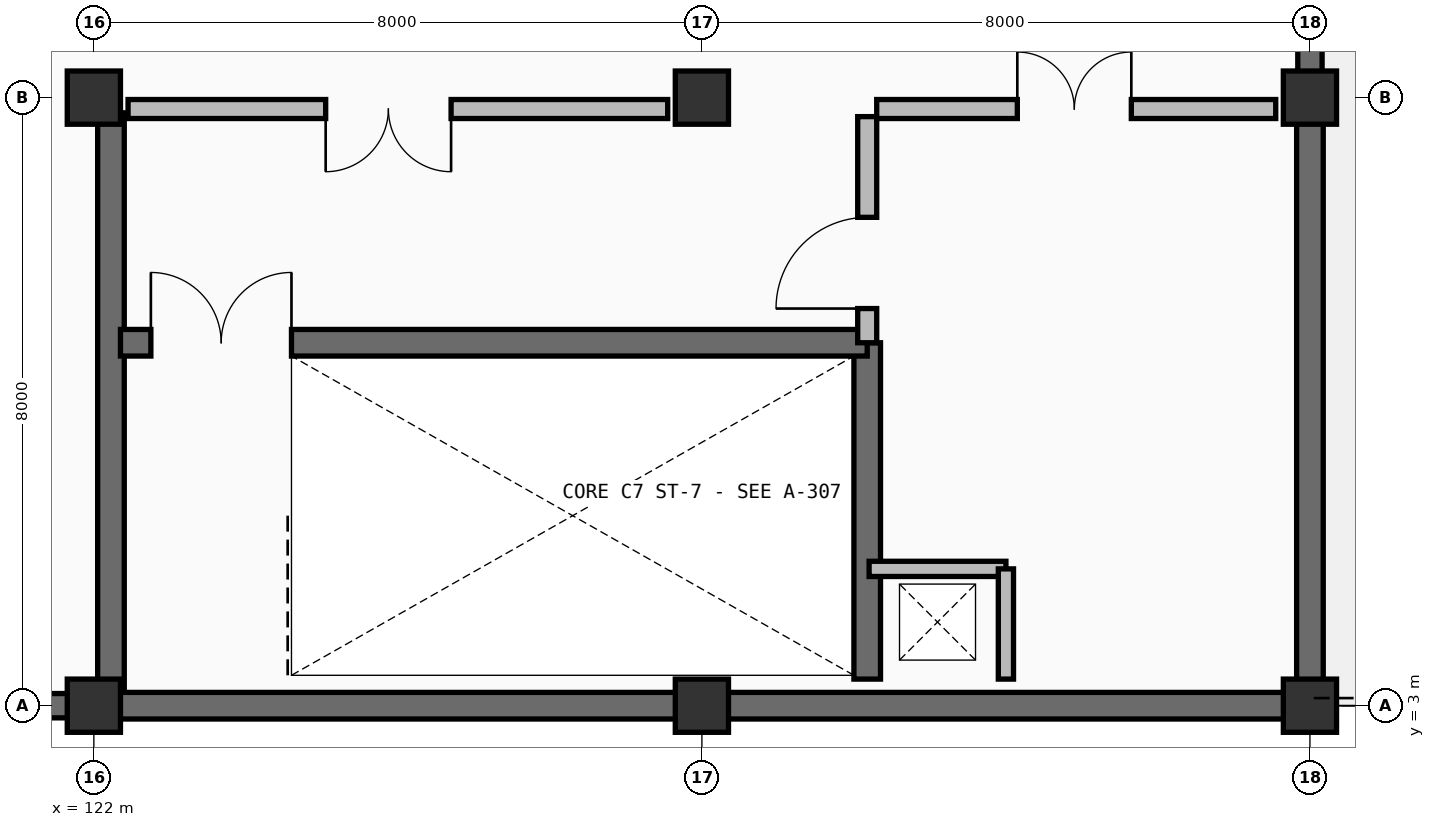
"""IFC4 building model, lengths in metres.
Left out: names, types, materials, properties, quantities, classifications, styles, units other than length and angle.
Written with IfcOpenShell. Run it as: python <this file> out.ifc"""

import sys

from ifc_helpers import new_model, si_unit, direction, frame, frame_2d, origin, origin_2d, place, context, subcontext, project, spatial, rectangle, extrude, element, fill, save


model = new_model("IFC4")
c1 = context("Model", 3, precision=1e-05, world=origin(), true_north=direction((0.0, 1.0)))
c2 = subcontext(c1, "Body", "Model", "MODEL_VIEW")
j1 = project(units=[si_unit("LENGTHUNIT", "METRE"), si_unit("PLANEANGLEUNIT", "RADIAN")], contexts=[c1])
p1 = place(None, origin())
s1 = spatial("IfcSite", under=j1, at=p1, CompositionType="ELEMENT")
p2 = place(p1, origin())
s2 = spatial("IfcBuilding", under=s1, at=p2, CompositionType="ELEMENT")
p3 = place(p2, frame((0.0, 0.0, 9.9)))
s3 = spatial("IfcBuildingStorey", under=s2, at=p3, CompositionType="ELEMENT", Elevation=9.9)
for number, where, z_axis, x_axis in (
    (1, (122.0, 3.0, 0.0), (0.0, 0.0, 1.0), (1.0, 0.0, 0.0)),
    (2, (122.0, 11.0, 0.0), (0.0, 0.0, 1.0), (1.0, 0.0, 0.0)),
    (3, (130.0, 3.0, 0.0), (0.0, 0.0, 1.0), (1.0, 0.0, 0.0)),
    (4, (130.0, 11.0, 0.0), (0.0, 0.0, 1.0), (1.0, 0.0, 0.0)),
    (5, (138.0, 3.0, 0.0), (0.0, 0.0, 1.0), (1.0, 0.0, 0.0)),
    (6, (138.0, 11.0, 0.0), (0.0, 0.0, 1.0), (1.0, 0.0, 0.0)),
):
    element("IfcColumn", number, at=place(p3, frame(where, z_axis=z_axis, x_axis=x_axis)), inside=s3, PredefinedType="COLUMN", context=c2, shape_type="SweptSolid", body=[
        extrude(rectangle(XDim=0.7, YDim=0.7, at=origin_2d()), origin(), (0.0, 0.0, 1.0), 4.5),
    ])
p4 = place(p3, frame((138.0, 19.0, 0.0), z_axis=(0.0, 0.0, 1.0), x_axis=(0.0, -1.0, 0.0)))
e7 = element("IfcWall", 7, at=p4, inside=s3, PredefinedType="SOLIDWALL", context=c2, shape_type="SweptSolid", body=[
    extrude(rectangle(XDim=8.0, YDim=0.32, at=frame_2d((4.0, 0.0))), origin(), (0.0, 0.0, 1.0), 4.5),
])
p5 = place(p4, frame((5.45, 0.0, 0.0)))
e8 = element("IfcOpeningElement", 8, at=p5, cuts=e7, PredefinedType="OPENING", context=c2, shape_type="SweptSolid", body=[
    extrude(rectangle(XDim=1.5, YDim=2.25, at=frame_2d((0.75, 1.125))), frame((0.0, 0.17, 0.0), z_axis=(0.0, -1.0, 0.0), x_axis=(1.0, 0.0, 0.0)), (0.0, 0.0, 1.0), 0.34),
])
for number, where, z_axis, x_axis in (
    (9, (138.0, 11.0, 0.0), (0.0, 0.0, 1.0), (0.0, -1.0, 0.0)),
    (10, (138.0, 3.0, 0.0), (0.0, 0.0, 1.0), (-1.0, 0.0, 0.0)),
    (11, (130.0, 3.0, 0.0), (0.0, 0.0, 1.0), (-1.0, 0.0, 0.0)),
):
    element("IfcWall", number, at=place(p3, frame(where, z_axis=z_axis, x_axis=x_axis)), inside=s3, PredefinedType="SHEAR", context=c2, shape_type="SweptSolid", body=[
        extrude(rectangle(XDim=8.0, YDim=0.35, at=frame_2d((4.0, 0.0))), origin(), (0.0, 0.0, 1.0), 4.5),
    ])
p6 = place(p3, frame((122.0, 3.0, 0.0), z_axis=(0.0, 0.0, 1.0), x_axis=(-1.0, 0.0, 0.0)))
e12 = element("IfcWall", 12, at=p6, inside=s3, PredefinedType="SOLIDWALL", context=c2, shape_type="SweptSolid", body=[
    extrude(rectangle(XDim=8.0, YDim=0.32, at=frame_2d((4.0, 0.0))), origin(), (0.0, 0.0, 1.0), 4.5),
])
p7 = place(p6, frame((1.85, 0.0, 1.0)))
e13 = element("IfcOpeningElement", 13, at=p7, cuts=e12, PredefinedType="OPENING", context=c2, shape_type="SweptSolid", body=[
    extrude(rectangle(XDim=1.1, YDim=1.45, at=frame_2d((0.55, 0.725))), frame((0.0, 0.17, 0.0), z_axis=(0.0, -1.0, 0.0), x_axis=(1.0, 0.0, 0.0)), (0.0, 0.0, 1.0), 0.34),
])
p8 = place(p6, frame((5.05, 0.0, 1.0)))
e14 = element("IfcOpeningElement", 14, at=p8, cuts=e12, PredefinedType="OPENING", context=c2, shape_type="SweptSolid", body=[
    extrude(rectangle(XDim=1.1, YDim=1.45, at=frame_2d((0.55, 0.725))), frame((0.0, 0.17, 0.0), z_axis=(0.0, -1.0, 0.0), x_axis=(1.0, 0.0, 0.0)), (0.0, 0.0, 1.0), 0.34),
])
p9 = place(p3, frame((122.225, 3.2, 0.0), z_axis=(0.0, 0.0, 1.0), x_axis=(0.0, 1.0, 0.0)))
e15 = element("IfcWall", 15, at=p9, inside=s3, PredefinedType="SHEAR", context=c2, shape_type="SweptSolid", body=[
    extrude(rectangle(XDim=7.6, YDim=0.35, at=frame_2d((3.8, 0.0))), origin(), (0.0, 0.0, 1.0), 4.2),
])
p10 = place(p3, frame((132.175, 3.35, 0.0), z_axis=(0.0, 0.0, 1.0), x_axis=(0.0, 1.0, 0.0)))
e16 = element("IfcWall", 16, at=p10, inside=s3, PredefinedType="SHEAR", context=c2, shape_type="SweptSolid", body=[
    extrude(rectangle(XDim=4.425, YDim=0.35, at=frame_2d((2.212, 0.0))), origin(), (0.0, 0.0, 1.0), 4.2),
])
p11 = place(p3, frame((132.2, 4.8, 0.0), z_axis=(0.0, 0.0, 1.0), x_axis=(1.0, 0.0, 0.0)))
e17 = element("IfcWall", 17, at=p11, inside=s3, PredefinedType="PARTITIONING", context=c2, shape_type="SweptSolid", body=[
    extrude(rectangle(XDim=1.8, YDim=0.2, at=frame_2d((0.9, 0.0))), origin(), (0.0, 0.0, 1.0), 4.2),
])
p12 = place(p3, frame((134.0, 3.35, 0.0), z_axis=(0.0, 0.0, 1.0), x_axis=(0.0, 1.0, 0.0)))
e18 = element("IfcWall", 18, at=p12, inside=s3, PredefinedType="PARTITIONING", context=c2, shape_type="SweptSolid", body=[
    extrude(rectangle(XDim=1.45, YDim=0.2, at=frame_2d((0.725, 0.0))), origin(), (0.0, 0.0, 1.0), 4.2),
])
p13 = place(p3, frame((122.35, 7.775, 0.0), z_axis=(0.0, 0.0, 1.0), x_axis=(1.0, 0.0, 0.0)))
e19 = element("IfcWall", 19, at=p13, inside=s3, PredefinedType="SHEAR", context=c2, shape_type="SweptSolid", body=[
    extrude(rectangle(XDim=9.825, YDim=0.35, at=frame_2d((4.913, 0.0))), origin(), (0.0, 0.0, 1.0), 4.2),
])
p14 = place(p13, frame((0.4, 0.0, 0.0)))
e20 = element("IfcOpeningElement", 20, at=p14, cuts=e19, PredefinedType="OPENING", context=c2, shape_type="SweptSolid", body=[
    extrude(rectangle(XDim=1.85, YDim=2.25, at=frame_2d((0.925, 1.125))), frame((0.0, 0.185, 0.0), z_axis=(0.0, -1.0, 0.0), x_axis=(1.0, 0.0, 0.0)), (0.0, 0.0, 1.0), 0.37),
])
p15 = place(p3, frame((132.175, 7.775, 0.0), z_axis=(0.0, 0.0, 1.0), x_axis=(0.0, 1.0, 0.0)))
e21 = element("IfcWall", 21, at=p15, inside=s3, PredefinedType="PARTITIONING", context=c2, shape_type="SweptSolid", body=[
    extrude(rectangle(XDim=2.975, YDim=0.25, at=frame_2d((1.488, 0.0))), origin(), (0.0, 0.0, 1.0), 4.2),
])
p16 = place(p15, frame((0.45, 0.0, 0.0)))
e22 = element("IfcOpeningElement", 22, at=p16, cuts=e21, PredefinedType="OPENING", context=c2, shape_type="SweptSolid", body=[
    extrude(rectangle(XDim=1.2, YDim=2.2, at=frame_2d((0.6, 1.1))), frame((0.0, 0.135, 0.0), z_axis=(0.0, -1.0, 0.0), x_axis=(1.0, 0.0, 0.0)), (0.0, 0.0, 1.0), 0.27),
])
p17 = place(p3, frame((122.45, 10.85, 0.0), z_axis=(0.0, 0.0, 1.0), x_axis=(1.0, 0.0, 0.0)))
e23 = element("IfcWall", 23, at=p17, inside=s3, PredefinedType="PARTITIONING", context=c2, shape_type="SweptSolid", body=[
    extrude(rectangle(XDim=7.1, YDim=0.25, at=frame_2d((3.55, 0.0))), origin(), (0.0, 0.0, 1.0), 4.2),
])
p18 = place(p17, frame((2.6, 0.0, 0.0)))
e24 = element("IfcOpeningElement", 24, at=p18, cuts=e23, PredefinedType="OPENING", context=c2, shape_type="SweptSolid", body=[
    extrude(rectangle(XDim=1.65, YDim=2.25, at=frame_2d((0.825, 1.125))), frame((0.0, 0.135, 0.0), z_axis=(0.0, -1.0, 0.0), x_axis=(1.0, 0.0, 0.0)), (0.0, 0.0, 1.0), 0.27),
])
p19 = place(p3, frame((132.3, 10.85, 0.0), z_axis=(0.0, 0.0, 1.0), x_axis=(1.0, 0.0, 0.0)))
e25 = element("IfcWall", 25, at=p19, inside=s3, PredefinedType="PARTITIONING", context=c2, shape_type="SweptSolid", body=[
    extrude(rectangle(XDim=5.25, YDim=0.25, at=frame_2d((2.625, 0.0))), origin(), (0.0, 0.0, 1.0), 4.2),
])
p20 = place(p19, frame((1.85, 0.0, 0.0)))
e26 = element("IfcOpeningElement", 26, at=p20, cuts=e25, PredefinedType="OPENING", context=c2, shape_type="SweptSolid", body=[
    extrude(rectangle(XDim=1.5, YDim=2.2, at=frame_2d((0.75, 1.1))), frame((0.0, 0.135, 0.0), z_axis=(0.0, -1.0, 0.0), x_axis=(1.0, 0.0, 0.0)), (0.0, 0.0, 1.0), 0.27),
])
p21 = place(p14, origin())
e27 = element("IfcDoor", 27, at=p21, inside=s3, OperationType="DOUBLE_DOOR_SINGLE_SWING", PredefinedType="DOOR", context=c2, shape_type="SweptSolid", body=[
    extrude(rectangle(XDim=1.85, YDim=2.25, at=frame_2d((0.925, 1.125))), frame((0.0, 0.025, 0.0), z_axis=(0.0, -1.0, 0.0), x_axis=(1.0, 0.0, 0.0)), (0.0, 0.0, 1.0), 0.05),
])
fill(e20, e27)
p22 = place(p16, origin())
e28 = element("IfcDoor", 28, at=p22, inside=s3, OperationType="SINGLE_SWING_LEFT", PredefinedType="DOOR", context=c2, shape_type="SweptSolid", body=[
    extrude(rectangle(XDim=1.2, YDim=2.2, at=frame_2d((0.6, 1.1))), frame((0.0, 0.025, 0.0), z_axis=(0.0, -1.0, 0.0), x_axis=(1.0, 0.0, 0.0)), (0.0, 0.0, 1.0), 0.05),
])
fill(e22, e28)
p23 = place(p18, frame((1.65, 0.0, 0.0), z_axis=(0.0, 0.0, 1.0), x_axis=(-1.0, 0.0, 0.0)))
e29 = element("IfcDoor", 29, at=p23, inside=s3, OperationType="DOUBLE_DOOR_SINGLE_SWING", PredefinedType="DOOR", context=c2, shape_type="SweptSolid", body=[
    extrude(rectangle(XDim=1.65, YDim=2.25, at=frame_2d((0.825, 1.125))), frame((0.0, 0.025, 0.0), z_axis=(0.0, -1.0, 0.0), x_axis=(1.0, 0.0, 0.0)), (0.0, 0.0, 1.0), 0.05),
])
fill(e24, e29)
p24 = place(p20, origin())
e30 = element("IfcDoor", 30, at=p24, inside=s3, OperationType="DOUBLE_DOOR_SINGLE_SWING", PredefinedType="DOOR", context=c2, shape_type="SweptSolid", body=[
    extrude(rectangle(XDim=1.5, YDim=2.2, at=frame_2d((0.75, 1.1))), frame((0.0, 0.025, 0.0), z_axis=(0.0, -1.0, 0.0), x_axis=(1.0, 0.0, 0.0)), (0.0, 0.0, 1.0), 0.05),
])
fill(e26, e30)
save(model, sys.argv[1])
